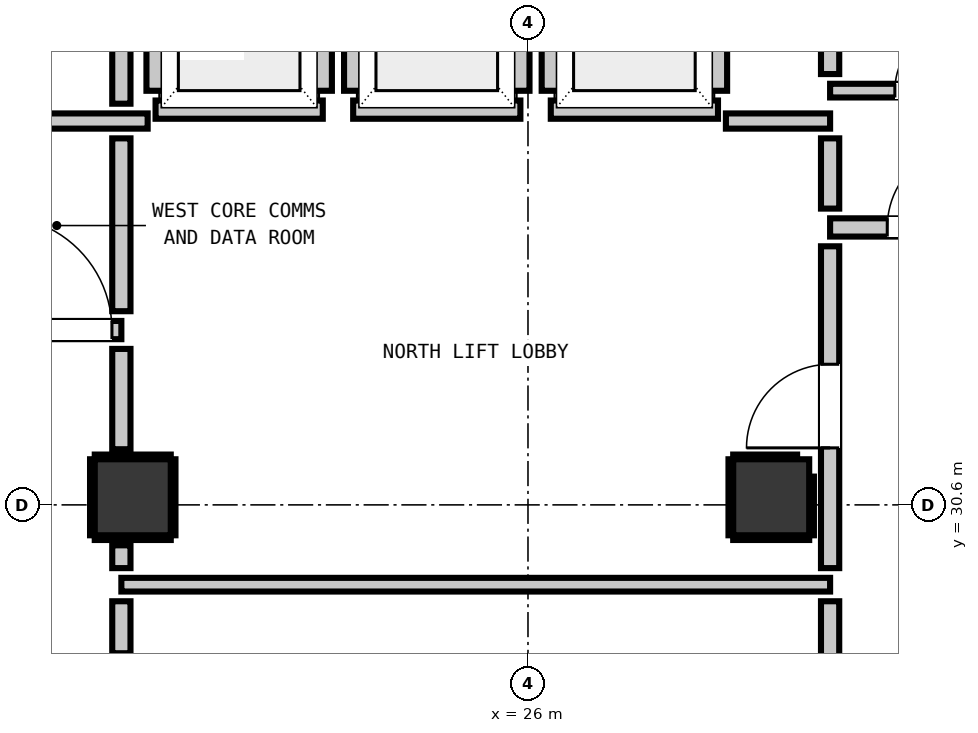
"""IFC4 building model, lengths in metres.
Left out: names, types, materials, properties, quantities, classifications, styles, units other than length and angle.
Written with IfcOpenShell. Run it as: python <this file> out.ifc"""

import sys

from ifc_helpers import new_model, si_unit, direction, frame, frame_2d, origin, origin_2d, place, context, subcontext, project, spatial, rectangle, extrude, element, fill, save


model = new_model("IFC4")
c1 = context("Model", 3, precision=1e-05, world=origin(), true_north=direction((0.0, 1.0)))
c2 = subcontext(c1, "Body", "Model", "MODEL_VIEW")
j1 = project(units=[si_unit("LENGTHUNIT", "METRE"), si_unit("PLANEANGLEUNIT", "RADIAN")], contexts=[c1])
p1 = place(None, origin())
s1 = spatial("IfcSite", under=j1, at=p1, CompositionType="ELEMENT")
p2 = place(p1, origin())
s2 = spatial("IfcBuilding", under=s1, at=p2, CompositionType="ELEMENT")
p3 = place(p2, frame((0.0, 0.0, 51.88)))
s3 = spatial("IfcBuildingStorey", under=s2, at=p3, CompositionType="ELEMENT", Elevation=51.88)
for number, where, z_axis, x_axis in (
    (1, (20.8, 30.7, 0.0), (0.0, 0.0, 1.0), (1.0, 0.0, 0.0)),
    (2, (29.2, 30.7, 0.0), (0.0, 0.0, 1.0), (1.0, 0.0, 0.0)),
):
    element("IfcColumn", number, at=place(p3, frame(where, z_axis=z_axis, x_axis=x_axis)), inside=s3, PredefinedType="COLUMN", context=c2, shape_type="SweptSolid", body=[
        extrude(rectangle(XDim=1.0, YDim=1.0, at=origin_2d()), origin(), (0.0, 0.0, 1.0), 3.32),
    ])
p4 = place(p3, frame((21.1, 35.8, 0.0), z_axis=(0.0, 0.0, 1.0), x_axis=(1.0, 0.0, 0.0)))
e3 = element("IfcWall", 3, at=p4, inside=s3, PredefinedType="PARTITIONING", context=c2, shape_type="SweptSolid", body=[
    extrude(rectangle(XDim=2.2, YDim=0.24, at=frame_2d((1.1, 0.0))), origin(), (0.0, 0.0, 1.0), 3.06),
])
p5 = place(p3, frame((21.1, 36.048, 0.0), z_axis=(0.0, 0.0, 1.0), x_axis=(0.0, 1.0, 0.0)))
e4 = element("IfcWall", 4, at=p5, inside=s3, PredefinedType="PARTITIONING", context=c2, shape_type="SweptSolid", body=[
    extrude(rectangle(XDim=2.104, YDim=0.24, at=frame_2d((1.052, 0.0))), origin(), (0.0, 0.0, 1.0), 2.295),
])
p6 = place(p3, frame((23.3, 36.048, 0.0), z_axis=(0.0, 0.0, 1.0), x_axis=(0.0, 1.0, 0.0)))
e5 = element("IfcWall", 5, at=p6, inside=s3, PredefinedType="PARTITIONING", context=c2, shape_type="SweptSolid", body=[
    extrude(rectangle(XDim=2.104, YDim=0.24, at=frame_2d((1.052, 0.0))), origin(), (0.0, 0.0, 1.0), 3.06),
])
p7 = place(p3, frame((23.7, 35.8, 0.0), z_axis=(0.0, 0.0, 1.0), x_axis=(1.0, 0.0, 0.0)))
e6 = element("IfcWall", 6, at=p7, inside=s3, PredefinedType="PARTITIONING", context=c2, shape_type="SweptSolid", body=[
    extrude(rectangle(XDim=2.2, YDim=0.24, at=frame_2d((1.1, 0.0))), origin(), (0.0, 0.0, 1.0), 3.06),
])
for number, where, z_axis, x_axis in (
    (7, (23.7, 36.048, 0.0), (0.0, 0.0, 1.0), (0.0, 1.0, 0.0)),
    (8, (25.9, 36.048, 0.0), (0.0, 0.0, 1.0), (0.0, 1.0, 0.0)),
):
    element("IfcWall", number, at=place(p3, frame(where, z_axis=z_axis, x_axis=x_axis)), inside=s3, PredefinedType="PARTITIONING", context=c2, shape_type="SweptSolid", body=[
        extrude(rectangle(XDim=2.104, YDim=0.24, at=frame_2d((1.052, 0.0))), origin(), (0.0, 0.0, 1.0), 3.06),
    ])
p8 = place(p3, frame((26.3, 35.8, 0.0), z_axis=(0.0, 0.0, 1.0), x_axis=(1.0, 0.0, 0.0)))
e9 = element("IfcWall", 9, at=p8, inside=s3, PredefinedType="PARTITIONING", context=c2, shape_type="SweptSolid", body=[
    extrude(rectangle(XDim=2.2, YDim=0.24, at=frame_2d((1.1, 0.0))), origin(), (0.0, 0.0, 1.0), 3.06),
])
for number, where, z_axis, x_axis in (
    (10, (26.3, 36.048, 0.0), (0.0, 0.0, 1.0), (0.0, 1.0, 0.0)),
    (11, (28.5, 36.048, 0.0), (0.0, 0.0, 1.0), (0.0, 1.0, 0.0)),
):
    element("IfcWall", number, at=place(p3, frame(where, z_axis=z_axis, x_axis=x_axis)), inside=s3, PredefinedType="PARTITIONING", context=c2, shape_type="SweptSolid", body=[
        extrude(rectangle(XDim=2.104, YDim=0.24, at=frame_2d((1.052, 0.0))), origin(), (0.0, 0.0, 1.0), 3.06),
    ])
p9 = place(p3, frame((17.45, 32.9, 0.0), z_axis=(0.0, 0.0, 1.0), x_axis=(1.0, 0.0, 0.0)))
e12 = element("IfcWall", 12, at=p9, inside=s3, PredefinedType="PARTITIONING", context=c2, shape_type="SweptSolid", body=[
    extrude(rectangle(XDim=3.2, YDim=0.24, at=frame_2d((1.6, 0.0))), origin(), (0.0, 0.0, 1.0), 3.06),
])
p10 = place(p9, frame((0.159, 0.0, 0.0)))
e13 = element("IfcOpeningElement", 13, at=p10, cuts=e12, PredefinedType="OPENING", context=c2, shape_type="SweptSolid", body=[
    extrude(rectangle(XDim=1.1, YDim=2.15, at=frame_2d((0.55, 1.075))), frame((0.0, 0.13, 0.0), z_axis=(0.0, -1.0, 0.0), x_axis=(1.0, 0.0, 0.0)), (0.0, 0.0, 1.0), 0.26),
])
p11 = place(p9, frame((1.576, 0.0, 0.0)))
e14 = element("IfcOpeningElement", 14, at=p11, cuts=e12, PredefinedType="OPENING", context=c2, shape_type="SweptSolid", body=[
    extrude(rectangle(XDim=1.5, YDim=2.15, at=frame_2d((0.75, 1.075))), frame((0.0, 0.13, 0.0), z_axis=(0.0, -1.0, 0.0), x_axis=(1.0, 0.0, 0.0)), (0.0, 0.0, 1.0), 0.26),
])
p12 = place(p3, frame((29.975, 34.25, 0.0), z_axis=(0.0, 0.0, 1.0), x_axis=(1.0, 0.0, 0.0)))
e15 = element("IfcWall", 15, at=p12, inside=s3, PredefinedType="PARTITIONING", context=c2, shape_type="SweptSolid", body=[
    extrude(rectangle(XDim=2.475, YDim=0.24, at=frame_2d((1.237, 0.0))), origin(), (0.0, 0.0, 1.0), 3.06),
])
p13 = place(p12, frame((0.752, 0.0, 0.0)))
e16 = element("IfcOpeningElement", 16, at=p13, cuts=e15, PredefinedType="OPENING", context=c2, shape_type="SweptSolid", body=[
    extrude(rectangle(XDim=1.1, YDim=2.15, at=frame_2d((0.55, 1.075))), frame((0.0, 0.13, 0.0), z_axis=(0.0, -1.0, 0.0), x_axis=(1.0, 0.0, 0.0)), (0.0, 0.0, 1.0), 0.26),
])
p14 = place(p3, frame((18.95, 35.65, 0.0), z_axis=(0.0, 0.0, 1.0), x_axis=(1.0, 0.0, 0.0)))
e17 = element("IfcWall", 17, at=p14, inside=s3, PredefinedType="PARTITIONING", context=c2, shape_type="SweptSolid", body=[
    extrude(rectangle(XDim=2.046, YDim=0.2, at=frame_2d((1.023, 0.0))), origin(), (0.0, 0.0, 1.0), 3.06),
])
p15 = place(p3, frame((28.604, 35.65, 0.0), z_axis=(0.0, 0.0, 1.0), x_axis=(1.0, 0.0, 0.0)))
e18 = element("IfcWall", 18, at=p15, inside=s3, PredefinedType="PARTITIONING", context=c2, shape_type="SweptSolid", body=[
    extrude(rectangle(XDim=1.371, YDim=0.2, at=frame_2d((0.686, 0.0))), origin(), (0.0, 0.0, 1.0), 3.06),
])
p16 = place(p3, frame((20.65, 29.55, 0.0), z_axis=(0.0, 0.0, 1.0), x_axis=(1.0, 0.0, 0.0)))
e19 = element("IfcWall", 19, at=p16, inside=s3, PredefinedType="PARTITIONING", context=c2, shape_type="SweptSolid", body=[
    extrude(rectangle(XDim=9.325, YDim=0.18, at=frame_2d((4.663, 0.0))), origin(), (0.0, 0.0, 1.0), 3.06),
])
p17 = place(p3, frame((29.975, 36.05, 0.0), z_axis=(0.0, 0.0, 1.0), x_axis=(1.0, 0.0, 0.0)))
e20 = element("IfcWall", 20, at=p17, inside=s3, PredefinedType="PARTITIONING", context=c2, shape_type="SweptSolid", body=[
    extrude(rectangle(XDim=2.505, YDim=0.18, at=frame_2d((1.252, 0.0))), origin(), (0.0, 0.0, 1.0), 3.06),
])
p18 = place(p17, frame((0.852, 0.0, 0.0)))
e21 = element("IfcOpeningElement", 21, at=p18, cuts=e20, PredefinedType="OPENING", context=c2, shape_type="SweptSolid", body=[
    extrude(rectangle(XDim=0.9, YDim=2.1, at=frame_2d((0.45, 1.05))), frame((0.0, 0.1, 0.0), z_axis=(0.0, -1.0, 0.0), x_axis=(1.0, 0.0, 0.0)), (0.0, 0.0, 1.0), 0.2),
])
p19 = place(p3, frame((20.65, 28.648, 0.0), z_axis=(0.0, 0.0, 1.0), x_axis=(0.0, 1.0, 0.0)))
e22 = element("IfcWall", 22, at=p19, inside=s3, PredefinedType="PARTITIONING", context=c2, shape_type="SweptSolid", body=[
    extrude(rectangle(XDim=0.684, YDim=0.24, at=frame_2d((0.342, 0.0))), origin(), (0.0, 0.0, 1.0), 2.295),
])
p20 = place(p3, frame((20.65, 29.768, 0.0), z_axis=(0.0, 0.0, 1.0), x_axis=(0.0, 1.0, 0.0)))
e23 = element("IfcWall", 23, at=p20, inside=s3, PredefinedType="PARTITIONING", context=c2, shape_type="SweptSolid", body=[
    extrude(rectangle(XDim=0.3, YDim=0.24, at=frame_2d((0.15, 0.0))), origin(), (0.0, 0.0, 1.0), 2.295),
])
p21 = place(p3, frame((20.65, 31.332, 0.0), z_axis=(0.0, 0.0, 1.0), x_axis=(0.0, 1.0, 0.0)))
e24 = element("IfcWall", 24, at=p21, inside=s3, PredefinedType="PARTITIONING", context=c2, shape_type="SweptSolid", body=[
    extrude(rectangle(XDim=1.32, YDim=0.24, at=frame_2d((0.66, 0.0))), origin(), (0.0, 0.0, 1.0), 2.295),
])
p22 = place(p3, frame((20.65, 33.148, 0.0), z_axis=(0.0, 0.0, 1.0), x_axis=(0.0, 1.0, 0.0)))
e25 = element("IfcWall", 25, at=p22, inside=s3, PredefinedType="PARTITIONING", context=c2, shape_type="SweptSolid", body=[
    extrude(rectangle(XDim=2.274, YDim=0.24, at=frame_2d((1.137, 0.0))), origin(), (0.0, 0.0, 1.0), 2.295),
])
p23 = place(p3, frame((20.65, 35.878, 0.0), z_axis=(0.0, 0.0, 1.0), x_axis=(0.0, 1.0, 0.0)))
e26 = element("IfcWall", 26, at=p23, inside=s3, PredefinedType="PARTITIONING", context=c2, shape_type="SweptSolid", body=[
    extrude(rectangle(XDim=2.674, YDim=0.24, at=frame_2d((1.337, 0.0))), origin(), (0.0, 0.0, 1.0), 2.295),
])
p24 = place(p3, frame((29.975, 25.648, 0.0), z_axis=(0.0, 0.0, 1.0), x_axis=(0.0, 1.0, 0.0)))
e27 = element("IfcWall", 27, at=p24, inside=s3, PredefinedType="PARTITIONING", context=c2, shape_type="SweptSolid", body=[
    extrude(rectangle(XDim=3.684, YDim=0.24, at=frame_2d((1.842, 0.0))), origin(), (0.0, 0.0, 1.0), 3.06),
])
p25 = place(p3, frame((29.975, 29.768, 0.0), z_axis=(0.0, 0.0, 1.0), x_axis=(0.0, 1.0, 0.0)))
e28 = element("IfcWall", 28, at=p25, inside=s3, PredefinedType="PARTITIONING", context=c2, shape_type="SweptSolid", body=[
    extrude(rectangle(XDim=4.234, YDim=0.24, at=frame_2d((2.117, 0.0))), origin(), (0.0, 0.0, 1.0), 3.06),
])
p26 = place(p25, frame((1.582, 0.0, 0.0)))
e29 = element("IfcOpeningElement", 29, at=p26, cuts=e28, PredefinedType="OPENING", context=c2, shape_type="SweptSolid", body=[
    extrude(rectangle(XDim=1.1, YDim=2.15, at=frame_2d((0.55, 1.075))), frame((0.0, 0.13, 0.0), z_axis=(0.0, -1.0, 0.0), x_axis=(1.0, 0.0, 0.0)), (0.0, 0.0, 1.0), 0.26),
])
p27 = place(p3, frame((29.975, 34.498, 0.0), z_axis=(0.0, 0.0, 1.0), x_axis=(0.0, 1.0, 0.0)))
e30 = element("IfcWall", 30, at=p27, inside=s3, PredefinedType="PARTITIONING", context=c2, shape_type="SweptSolid", body=[
    extrude(rectangle(XDim=0.924, YDim=0.24, at=frame_2d((0.462, 0.0))), origin(), (0.0, 0.0, 1.0), 3.06),
])
p28 = place(p3, frame((29.975, 36.268, 0.0), z_axis=(0.0, 0.0, 1.0), x_axis=(0.0, 1.0, 0.0)))
e31 = element("IfcWall", 31, at=p28, inside=s3, PredefinedType="PARTITIONING", context=c2, shape_type="SweptSolid", body=[
    extrude(rectangle(XDim=2.284, YDim=0.24, at=frame_2d((1.142, 0.0))), origin(), (0.0, 0.0, 1.0), 3.06),
])
for number, where, z_axis, x_axis in (
    (32, (20.3, 30.168, 0.0), (0.0, 0.0, 1.0), (1.0, 0.0, 0.0)),
    (33, (20.3, 31.232, 0.0), (0.0, 0.0, 1.0), (1.0, 0.0, 0.0)),
    (34, (20.268, 30.2, 0.0), (0.0, 0.0, 1.0), (0.0, 1.0, 0.0)),
    (35, (21.332, 30.2, 0.0), (0.0, 0.0, 1.0), (0.0, 1.0, 0.0)),
    (36, (28.7, 30.168, 0.0), (0.0, 0.0, 1.0), (1.0, 0.0, 0.0)),
):
    element("IfcWall", number, at=place(p3, frame(where, z_axis=z_axis, x_axis=x_axis)), inside=s3, PredefinedType="PARTITIONING", context=c2, shape_type="SweptSolid", body=[
        extrude(rectangle(XDim=1.0, YDim=0.06, at=frame_2d((0.5, 0.0))), origin(), (0.0, 0.0, 1.0), 1.45),
    ])
p29 = place(p3, frame((28.7, 31.232, 0.0), z_axis=(0.0, 0.0, 1.0), x_axis=(1.0, 0.0, 0.0)))
e37 = element("IfcWall", 37, at=p29, inside=s3, PredefinedType="PARTITIONING", context=c2, shape_type="SweptSolid", body=[
    extrude(rectangle(XDim=0.841, YDim=0.06, at=frame_2d((0.42, 0.0))), origin(), (0.0, 0.0, 1.0), 1.45),
])
p30 = place(p3, frame((28.668, 30.2, 0.0), z_axis=(0.0, 0.0, 1.0), x_axis=(0.0, 1.0, 0.0)))
e38 = element("IfcWall", 38, at=p30, inside=s3, PredefinedType="PARTITIONING", context=c2, shape_type="SweptSolid", body=[
    extrude(rectangle(XDim=1.0, YDim=0.06, at=frame_2d((0.5, 0.0))), origin(), (0.0, 0.0, 1.0), 1.45),
])
p31 = place(p3, frame((29.732, 30.2, 0.0), z_axis=(0.0, 0.0, 1.0), x_axis=(0.0, 1.0, 0.0)))
e39 = element("IfcWall", 39, at=p31, inside=s3, PredefinedType="PARTITIONING", context=c2, shape_type="SweptSolid", body=[
    extrude(rectangle(XDim=0.772, YDim=0.06, at=frame_2d((0.386, 0.0))), origin(), (0.0, 0.0, 1.0), 1.45),
])
p32 = place(p26, origin())
e40 = element("IfcDoor", 40, at=p32, inside=s3, OperationType="SINGLE_SWING_LEFT", PredefinedType="DOOR", context=c2, shape_type="SweptSolid", body=[
    extrude(rectangle(XDim=1.1, YDim=2.15, at=frame_2d((0.55, 1.075))), frame((0.0, 0.025, 0.0), z_axis=(0.0, -1.0, 0.0), x_axis=(1.0, 0.0, 0.0)), (0.0, 0.0, 1.0), 0.05),
])
fill(e29, e40)
p33 = place(p13, origin())
e41 = element("IfcDoor", 41, at=p33, inside=s3, OperationType="SINGLE_SWING_RIGHT", PredefinedType="DOOR", context=c2, shape_type="SweptSolid", body=[
    extrude(rectangle(XDim=1.1, YDim=2.15, at=frame_2d((0.55, 1.075))), frame((0.0, 0.025, 0.0), z_axis=(0.0, -1.0, 0.0), x_axis=(1.0, 0.0, 0.0)), (0.0, 0.0, 1.0), 0.05),
])
fill(e16, e41)
p34 = place(p11, origin())
e42 = element("IfcDoor", 42, at=p34, inside=s3, OperationType="SINGLE_SWING_LEFT", PredefinedType="DOOR", context=c2, shape_type="SweptSolid", body=[
    extrude(rectangle(XDim=1.5, YDim=2.15, at=frame_2d((0.75, 1.075))), frame((0.0, 0.025, 0.0), z_axis=(0.0, -1.0, 0.0), x_axis=(1.0, 0.0, 0.0)), (0.0, 0.0, 1.0), 0.05),
])
fill(e14, e42)
p35 = place(p18, origin())
e43 = element("IfcDoor", 43, at=p35, inside=s3, OperationType="SINGLE_SWING_RIGHT", PredefinedType="DOOR", context=c2, shape_type="SweptSolid", body=[
    extrude(rectangle(XDim=0.9, YDim=2.1, at=frame_2d((0.45, 1.05))), frame((0.0, 0.025, 0.0), z_axis=(0.0, -1.0, 0.0), x_axis=(1.0, 0.0, 0.0)), (0.0, 0.0, 1.0), 0.05),
])
fill(e21, e43)
save(model, sys.argv[1])
